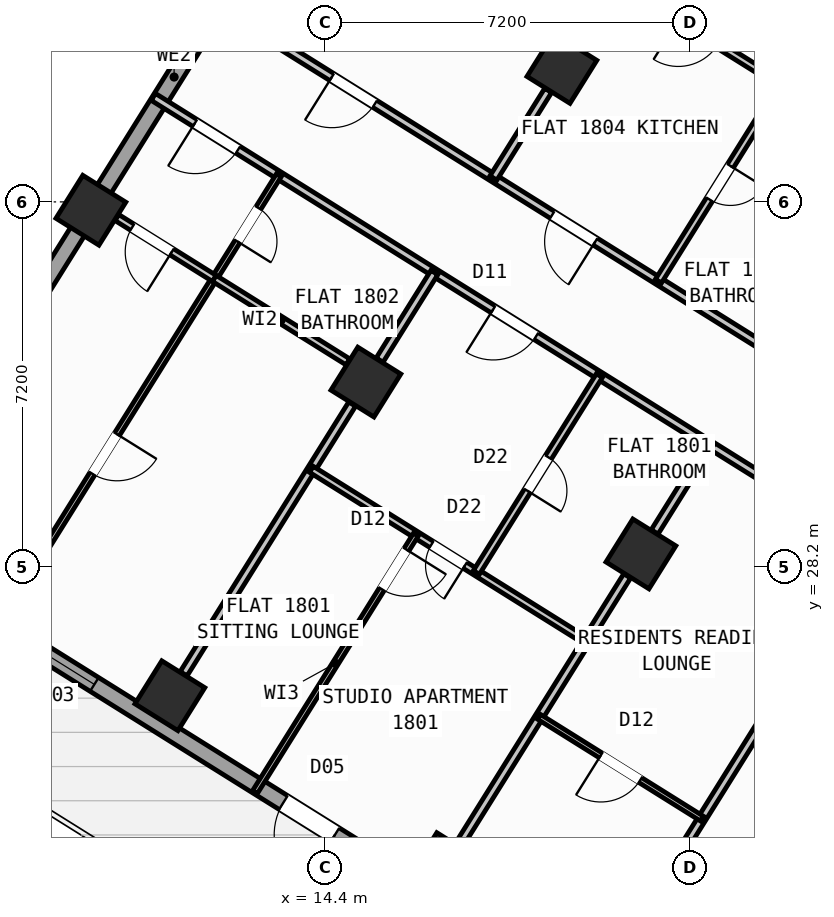
"""IFC4 building model, lengths in metres.
Left out: names, types, materials, properties, quantities, classifications, styles, units other than length and angle.
Written with IfcOpenShell. Run it as: python <this file> out.ifc"""

import sys

from ifc_helpers import new_model, si_unit, direction, frame, frame_2d, origin, origin_2d, place, context, subcontext, project, spatial, rectangle, hollow_rectangle, extrude, source, transform, mapped, element, fill, save


model = new_model("IFC4")
c1 = context("Model", 3, precision=1e-05, world=origin(), true_north=direction((0.0, 1.0)))
c2 = subcontext(c1, "Body", "Model", "MODEL_VIEW")
j1 = project(units=[si_unit("LENGTHUNIT", "METRE"), si_unit("PLANEANGLEUNIT", "RADIAN")], contexts=[c1])
p1 = place(None, origin())
s1 = spatial("IfcSite", under=j1, at=p1, CompositionType="ELEMENT")
p2 = place(p1, origin())
s2 = spatial("IfcBuilding", under=s1, at=p2, CompositionType="ELEMENT")
p3 = place(p2, frame((0.0, 0.0, 71.7)))
s3 = spatial("IfcBuildingStorey", under=s2, at=p3, CompositionType="ELEMENT", Elevation=71.7)
p4 = place(p3, frame((26.007, 24.976, 0.0), z_axis=(0.0, 0.0, 1.0), x_axis=(-0.529916319127, -0.848049936456, 0.0)))
e1 = element("IfcWall", 1, at=p4, inside=s3, PredefinedType="SHEAR", context=c2, shape_type="SweptSolid", body=[
    extrude(rectangle(XDim=6.375, YDim=0.65, at=frame_2d((3.188, 0.0))), origin(), (0.0, 0.0, 1.0), 4.52),
])
m1 = source(origin(), c2, "Body", "SweptSolid", [
    extrude(hollow_rectangle(XDim=1.0, YDim=1.0, WallThickness=0.04, at=origin_2d()), origin(), (0.0, 0.0, 1.0), 4.8),
])
for number, where, z_axis, x_axis in (
    (2, (20.632, 28.452, 0.0), (0.0, 0.0, 1.0), (-0.848, 0.53, 0.0)),
    (3, (16.764, 22.261, 0.0), (0.0, 0.0, 1.0), (-0.848, 0.53, 0.0)),
    (4, (19.073, 38.034, 0.0), (0.0, 0.0, 1.0), (-0.848, 0.53, 0.0)),
    (5, (15.205, 31.844, 0.0), (0.0, 0.0, 1.0), (-0.848, 0.53, 0.0)),
    (6, (11.336, 25.653, 0.0), (0.0, 0.0, 1.0), (-0.848, 0.53, 0.0)),
    (7, (9.777, 35.235, 0.0), (0.0, 0.0, 1.0), (-0.848, 0.53, 0.0)),
):
    element("IfcColumn", number, at=place(p3, frame(where, z_axis=z_axis, x_axis=x_axis)), inside=s3, PredefinedType="COLUMN", context=c2, shape_type="MappedRepresentation", body=[
        mapped(m1, transform((0.0, 0.0, 0.0), scale=1.0)),
    ])
p5 = place(p3, frame((31.76, 12.183, 0.0), z_axis=(0.0, 0.0, 1.0), x_axis=(-0.848047074256, 0.529920899612, 0.0)))
e8 = element("IfcWall", 8, at=p5, inside=s3, PredefinedType="STANDARD", context=c2, shape_type="SweptSolid", body=[
    extrude(rectangle(XDim=30.652, YDim=0.32, at=frame_2d((15.326, 0.0))), origin(), (0.0, 0.0, 1.0), 4.52),
])
p6 = place(p5, frame((20.241, 0.0, 0.0)))
e9 = element("IfcOpeningElement", 9, at=p6, cuts=e8, PredefinedType="OPENING", context=c2, shape_type="SweptSolid", body=[
    extrude(rectangle(XDim=1.2, YDim=2.15, at=frame_2d((0.6, 1.075))), frame((0.0, 0.17, 0.0), z_axis=(0.0, -1.0, 0.0), x_axis=(1.0, 0.0, 0.0)), (0.0, 0.0, 1.0), 0.34),
])
p7 = place(p5, frame((14.781, 0.0, 0.0)))
e10 = element("IfcOpeningElement", 10, at=p7, cuts=e8, PredefinedType="OPENING", context=c2, shape_type="SweptSolid", body=[
    extrude(rectangle(XDim=1.5, YDim=2.25, at=frame_2d((0.75, 1.125))), frame((0.0, 0.17, 0.0), z_axis=(0.0, -1.0, 0.0), x_axis=(1.0, 0.0, 0.0)), (0.0, 0.0, 1.0), 0.34),
])
p8 = place(p5, frame((1.84, 0.0, 0.75)))
e11 = element("IfcOpeningElement", 11, at=p8, cuts=e8, PredefinedType="OPENING", context=c2, shape_type="SweptSolid", body=[
    extrude(rectangle(XDim=2.4, YDim=1.6, at=frame_2d((1.2, 0.8))), frame((0.0, 0.17, 0.0), z_axis=(0.0, -1.0, 0.0), x_axis=(1.0, 0.0, 0.0)), (0.0, 0.0, 1.0), 0.34),
])
p9 = place(p5, frame((7.019, 0.0, 0.75)))
e12 = element("IfcOpeningElement", 12, at=p9, cuts=e8, PredefinedType="OPENING", context=c2, shape_type="SweptSolid", body=[
    extrude(rectangle(XDim=2.4, YDim=1.6, at=frame_2d((1.2, 0.8))), frame((0.0, 0.17, 0.0), z_axis=(0.0, -1.0, 0.0), x_axis=(1.0, 0.0, 0.0)), (0.0, 0.0, 1.0), 0.34),
])
p10 = place(p5, frame((25.841, 0.0, 0.95)))
e13 = element("IfcOpeningElement", 13, at=p10, cuts=e8, PredefinedType="OPENING", context=c2, shape_type="SweptSolid", body=[
    extrude(rectangle(XDim=1.2, YDim=1.4, at=frame_2d((0.6, 0.7))), frame((0.0, 0.17, 0.0), z_axis=(0.0, -1.0, 0.0), x_axis=(1.0, 0.0, 0.0)), (0.0, 0.0, 1.0), 0.34),
])
p11 = place(p3, frame((5.7, 28.71, 0.0), z_axis=(0.0, 0.0, 1.0), x_axis=(0.529923711467, 0.8480453172, 0.0)))
e14 = element("IfcWall", 14, at=p11, inside=s3, PredefinedType="STANDARD", context=c2, shape_type="SweptSolid", body=[
    extrude(rectangle(XDim=21.587, YDim=0.32, at=frame_2d((10.794, 0.0))), origin(), (0.0, 0.0, 1.0), 3.895),
])
p12 = place(p11, frame((2.844, 0.0, 0.75)))
e15 = element("IfcOpeningElement", 15, at=p12, cuts=e14, PredefinedType="OPENING", context=c2, shape_type="SweptSolid", body=[
    extrude(rectangle(XDim=2.4, YDim=1.6, at=frame_2d((1.2, 0.8))), frame((0.0, 0.17, 0.0), z_axis=(0.0, -1.0, 0.0), x_axis=(1.0, 0.0, 0.0)), (0.0, 0.0, 1.0), 0.34),
])
p13 = place(p3, frame((17.424, 47.083, 0.0), z_axis=(0.0, 0.0, 1.0), x_axis=(0.848049927979, -0.529916332693, 0.0)))
e16 = element("IfcWall", 16, at=p13, inside=s3, PredefinedType="STANDARD", context=c2, shape_type="SweptSolid", body=[
    extrude(rectangle(XDim=29.223, YDim=0.32, at=frame_2d((14.612, 0.0))), origin(), (0.0, 0.0, 1.0), 4.52),
])
p14 = place(p13, frame((3.339, 0.0, 0.0)))
e17 = element("IfcOpeningElement", 17, at=p14, cuts=e16, PredefinedType="OPENING", context=c2, shape_type="SweptSolid", body=[
    extrude(rectangle(XDim=1.05, YDim=2.15, at=frame_2d((0.525, 1.075))), frame((0.0, 0.17, 0.0), z_axis=(0.0, -1.0, 0.0), x_axis=(1.0, 0.0, 0.0)), (0.0, 0.0, 1.0), 0.34),
])
p15 = place(p13, frame((8.194, 0.0, 0.75)))
e18 = element("IfcOpeningElement", 18, at=p15, cuts=e16, PredefinedType="OPENING", context=c2, shape_type="SweptSolid", body=[
    extrude(rectangle(XDim=2.4, YDim=1.6, at=frame_2d((1.2, 0.8))), frame((0.0, 0.17, 0.0), z_axis=(0.0, -1.0, 0.0), x_axis=(1.0, 0.0, 0.0)), (0.0, 0.0, 1.0), 0.34),
])
p16 = place(p13, frame((22.226, 0.0, 0.85)))
e19 = element("IfcOpeningElement", 19, at=p16, cuts=e16, PredefinedType="OPENING", context=c2, shape_type="SweptSolid", body=[
    extrude(rectangle(XDim=1.8, YDim=1.5, at=frame_2d((0.9, 0.75))), frame((0.0, 0.17, 0.0), z_axis=(0.0, -1.0, 0.0), x_axis=(1.0, 0.0, 0.0)), (0.0, 0.0, 1.0), 0.34),
])
p17 = place(p13, frame((26.934, 0.0, 0.95)))
e20 = element("IfcOpeningElement", 20, at=p17, cuts=e16, PredefinedType="OPENING", context=c2, shape_type="SweptSolid", body=[
    extrude(rectangle(XDim=1.2, YDim=1.4, at=frame_2d((0.6, 0.7))), frame((0.0, 0.17, 0.0), z_axis=(0.0, -1.0, 0.0), x_axis=(1.0, 0.0, 0.0)), (0.0, 0.0, 1.0), 0.34),
])
p18 = place(p13, frame((14.636, 0.0, 1.0)))
e21 = element("IfcOpeningElement", 21, at=p18, cuts=e16, PredefinedType="OPENING", context=c2, shape_type="SweptSolid", body=[
    extrude(rectangle(XDim=0.9, YDim=1.25, at=frame_2d((0.45, 0.625))), frame((0.0, 0.17, 0.0), z_axis=(0.0, -1.0, 0.0), x_axis=(1.0, 0.0, 0.0)), (0.0, 0.0, 1.0), 0.34),
])
p19 = place(p3, frame((25.198, 28.606, 0.0), z_axis=(0.0, 0.0, 1.0), x_axis=(-0.529926497642, -0.848043576178, 0.0)))
e22 = element("IfcWall", 22, at=p19, inside=s3, PredefinedType="PARTITIONING", context=c2, shape_type="SweptSolid", body=[
    extrude(rectangle(XDim=10.3, YDim=0.16, at=frame_2d((5.15, 0.0))), origin(), (0.0, 0.0, 1.0), 4.51),
])
p20 = place(p3, frame((26.363, 30.472, 0.0), z_axis=(0.0, 0.0, 1.0), x_axis=(-0.848052408131, 0.529912363569, 0.0)))
e23 = element("IfcWall", 23, at=p20, inside=s3, PredefinedType="PARTITIONING", context=c2, shape_type="SweptSolid", body=[
    extrude(rectangle(XDim=16.73, YDim=0.16, at=frame_2d((8.365, 0.0))), origin(), (0.0, 0.0, 1.0), 4.51),
])
p21 = place(p20, frame((2.22, 0.0, 0.0)))
e24 = element("IfcOpeningElement", 24, at=p21, cuts=e23, PredefinedType="OPENING", context=c2, shape_type="SweptSolid", body=[
    extrude(rectangle(XDim=0.86, YDim=2.05, at=frame_2d((0.43, 1.025))), frame((0.0, 0.09, 0.0), z_axis=(0.0, -1.0, 0.0), x_axis=(1.0, 0.0, 0.0)), (0.0, 0.0, 1.0), 0.18),
])
p22 = place(p20, frame((7.82, 0.0, 0.0)))
e25 = element("IfcOpeningElement", 25, at=p22, cuts=e23, PredefinedType="OPENING", context=c2, shape_type="SweptSolid", body=[
    extrude(rectangle(XDim=1.0, YDim=2.1, at=frame_2d((0.5, 1.05))), frame((0.0, 0.09, 0.0), z_axis=(0.0, -1.0, 0.0), x_axis=(1.0, 0.0, 0.0)), (0.0, 0.0, 1.0), 0.18),
])
p23 = place(p20, frame((12.95, 0.0, 0.0)))
e26 = element("IfcOpeningElement", 26, at=p23, cuts=e23, PredefinedType="OPENING", context=c2, shape_type="SweptSolid", body=[
    extrude(rectangle(XDim=1.0, YDim=2.1, at=frame_2d((0.5, 1.05))), frame((0.0, 0.09, 0.0), z_axis=(0.0, -1.0, 0.0), x_axis=(1.0, 0.0, 0.0)), (0.0, 0.0, 1.0), 0.18),
])
p24 = place(p3, frame((25.198, 28.606, 0.0), z_axis=(0.0, 0.0, 1.0), x_axis=(-0.848052408131, 0.529912363569, 0.0)))
e27 = element("IfcWall", 27, at=p24, inside=s3, PredefinedType="PARTITIONING", context=c2, shape_type="SweptSolid", body=[
    extrude(rectangle(XDim=16.73, YDim=0.16, at=frame_2d((8.365, 0.0))), origin(), (0.0, 0.0, 1.0), 4.51),
])
p25 = place(p24, frame((1.395, 0.0, 0.0)))
e28 = element("IfcOpeningElement", 28, at=p25, cuts=e27, PredefinedType="OPENING", context=c2, shape_type="SweptSolid", body=[
    extrude(rectangle(XDim=1.0, YDim=2.1, at=frame_2d((0.5, 1.05))), frame((0.0, 0.09, 0.0), z_axis=(0.0, -1.0, 0.0), x_axis=(1.0, 0.0, 0.0)), (0.0, 0.0, 1.0), 0.18),
])
p26 = place(p24, frame((7.82, 0.0, 0.0)))
e29 = element("IfcOpeningElement", 29, at=p26, cuts=e27, PredefinedType="OPENING", context=c2, shape_type="SweptSolid", body=[
    extrude(rectangle(XDim=1.0, YDim=2.1, at=frame_2d((0.5, 1.05))), frame((0.0, 0.09, 0.0), z_axis=(0.0, -1.0, 0.0), x_axis=(1.0, 0.0, 0.0)), (0.0, 0.0, 1.0), 0.18),
])
p27 = place(p24, frame((14.76, 0.0, 0.0)))
e30 = element("IfcOpeningElement", 30, at=p27, cuts=e27, PredefinedType="OPENING", context=c2, shape_type="SweptSolid", body=[
    extrude(rectangle(XDim=1.0, YDim=2.1, at=frame_2d((0.5, 1.05))), frame((0.0, 0.09, 0.0), z_axis=(0.0, -1.0, 0.0), x_axis=(1.0, 0.0, 0.0)), (0.0, 0.0, 1.0), 0.18),
])
p28 = place(p3, frame((21.983, 30.615, 0.0), z_axis=(0.0, 0.0, 1.0), x_axis=(-0.529966635742, -0.848018493313, 0.0)))
e31 = element("IfcWall", 31, at=p28, inside=s3, PredefinedType="PARTITIONING", context=c2, shape_type="SweptSolid", body=[
    extrude(rectangle(XDim=2.038, YDim=0.16, at=frame_2d((1.019, 0.0))), origin(), (0.0, 0.0, 1.0), 3.895),
])
p29 = place(p3, frame((20.361, 28.018, 0.0), z_axis=(0.0, 0.0, 1.0), x_axis=(-0.529915015264, -0.848050751193, 0.0)))
e32 = element("IfcWall", 32, at=p29, inside=s3, PredefinedType="PARTITIONING", context=c2, shape_type="SweptSolid", body=[
    extrude(rectangle(XDim=6.276, YDim=0.16, at=frame_2d((3.138, 0.0))), origin(), (0.0, 0.0, 1.0), 3.895),
])
p30 = place(p3, frame((21.837, 23.228, 0.0), z_axis=(0.0, 0.0, 1.0), x_axis=(-0.84803087207, 0.529946827537, 0.0)))
e33 = element("IfcWall", 33, at=p30, inside=s3, PredefinedType="PARTITIONING", context=c2, shape_type="SweptSolid", body=[
    extrude(rectangle(XDim=3.79, YDim=0.11, at=frame_2d((1.895, 0.0))), origin(), (0.0, 0.0, 1.0), 4.51),
])
p31 = place(p30, frame((1.435, 0.0, 0.0)))
e34 = element("IfcOpeningElement", 34, at=p31, cuts=e33, PredefinedType="OPENING", context=c2, shape_type="SweptSolid", body=[
    extrude(rectangle(XDim=0.92, YDim=2.08, at=frame_2d((0.46, 1.04))), frame((0.0, 0.065, 0.0), z_axis=(0.0, -1.0, 0.0), x_axis=(1.0, 0.0, 0.0)), (0.0, 0.0, 1.0), 0.13),
])
p32 = place(p3, frame((16.556, 34.006, 0.0), z_axis=(0.0, 0.0, 1.0), x_axis=(-0.529966635742, -0.848018493313, 0.0)))
e35 = element("IfcWall", 35, at=p32, inside=s3, PredefinedType="PARTITIONING", context=c2, shape_type="SweptSolid", body=[
    extrude(rectangle(XDim=2.038, YDim=0.16, at=frame_2d((1.019, 0.0))), origin(), (0.0, 0.0, 1.0), 3.895),
])
p33 = place(p3, frame((14.933, 31.409, 0.0), z_axis=(0.0, 0.0, 1.0), x_axis=(-0.529897533635, -0.848061674554, 0.0)))
e36 = element("IfcWall", 36, at=p33, inside=s3, PredefinedType="PARTITIONING", context=c2, shape_type="SweptSolid", body=[
    extrude(rectangle(XDim=6.276, YDim=0.16, at=frame_2d((3.138, 0.0))), origin(), (0.0, 0.0, 1.0), 3.895),
])
p34 = place(p3, frame((19.556, 26.73, 0.0), z_axis=(0.0, 0.0, 1.0), x_axis=(-0.848049732085, 0.529916646191, 0.0)))
e37 = element("IfcWall", 37, at=p34, inside=s3, PredefinedType="PLUMBINGWALL", context=c2, shape_type="SweptSolid", body=[
    extrude(rectangle(XDim=6.4, YDim=0.14, at=frame_2d((3.2, 0.0))), origin(), (0.0, 0.0, 1.0), 4.51),
])
p35 = place(p34, frame((2.824, 0.0, 0.0)))
e38 = element("IfcOpeningElement", 38, at=p35, cuts=e37, PredefinedType="OPENING", context=c2, shape_type="SweptSolid", body=[
    extrude(rectangle(XDim=0.78, YDim=2.05, at=frame_2d((0.39, 1.025))), frame((0.0, 0.08, 0.0), z_axis=(0.0, -1.0, 0.0), x_axis=(1.0, 0.0, 0.0)), (0.0, 0.0, 1.0), 0.16),
])
p36 = place(p3, frame((19.812, 31.971, 0.0), z_axis=(0.0, 0.0, 1.0), x_axis=(-0.529917480809, -0.848049210561, 0.0)))
e39 = element("IfcWall", 39, at=p36, inside=s3, PredefinedType="PLUMBINGWALL", context=c2, shape_type="SweptSolid", body=[
    extrude(rectangle(XDim=4.58, YDim=0.14, at=frame_2d((2.29, 0.0))), origin(), (0.0, 0.0, 1.0), 4.51),
])
p37 = place(p36, frame((1.9, 0.0, 0.0)))
e40 = element("IfcOpeningElement", 40, at=p37, cuts=e39, PredefinedType="OPENING", context=c2, shape_type="SweptSolid", body=[
    extrude(rectangle(XDim=0.78, YDim=2.05, at=frame_2d((0.39, 1.025))), frame((0.0, 0.08, 0.0), z_axis=(0.0, -1.0, 0.0), x_axis=(1.0, 0.0, 0.0)), (0.0, 0.0, 1.0), 0.16),
])
p38 = place(p3, frame((16.191, 28.833, 0.0), z_axis=(0.0, 0.0, 1.0), x_axis=(-0.529900017123, -0.848060122782, 0.0)))
e41 = element("IfcWall", 41, at=p38, inside=s3, PredefinedType="PARTITIONING", context=c2, shape_type="SweptSolid", body=[
    extrude(rectangle(XDim=5.99, YDim=0.11, at=frame_2d((2.995, 0.0))), origin(), (0.0, 0.0, 1.0), 4.51),
])
p39 = place(p38, frame((0.35, 0.0, 0.0)))
e42 = element("IfcOpeningElement", 42, at=p39, cuts=e41, PredefinedType="OPENING", context=c2, shape_type="SweptSolid", body=[
    extrude(rectangle(XDim=0.92, YDim=2.08, at=frame_2d((0.46, 1.04))), frame((0.0, 0.065, 0.0), z_axis=(0.0, -1.0, 0.0), x_axis=(1.0, 0.0, 0.0)), (0.0, 0.0, 1.0), 0.13),
])
p40 = place(p3, frame((13.486, 35.924, 0.0), z_axis=(0.0, 0.0, 1.0), x_axis=(-0.529924195719, -0.848045014602, 0.0)))
e43 = element("IfcWall", 43, at=p40, inside=s3, PredefinedType="PARTITIONING", context=c2, shape_type="SweptSolid", body=[
    extrude(rectangle(XDim=10.57, YDim=0.11, at=frame_2d((5.285, 0.0))), origin(), (0.0, 0.0, 1.0), 4.51),
])
p41 = place(p40, frame((0.76, 0.0, 0.0)))
e44 = element("IfcOpeningElement", 44, at=p41, cuts=e43, PredefinedType="OPENING", context=c2, shape_type="SweptSolid", body=[
    extrude(rectangle(XDim=0.78, YDim=2.05, at=frame_2d((0.39, 1.025))), frame((0.0, 0.065, 0.0), z_axis=(0.0, -1.0, 0.0), x_axis=(1.0, 0.0, 0.0)), (0.0, 0.0, 1.0), 0.13),
])
p42 = place(p40, frame((6.025, 0.0, 0.0)))
e45 = element("IfcOpeningElement", 45, at=p42, cuts=e43, PredefinedType="OPENING", context=c2, shape_type="SweptSolid", body=[
    extrude(rectangle(XDim=0.92, YDim=2.08, at=frame_2d((0.46, 1.04))), frame((0.0, 0.065, 0.0), z_axis=(0.0, -1.0, 0.0), x_axis=(1.0, 0.0, 0.0)), (0.0, 0.0, 1.0), 0.13),
])
p43 = place(p3, frame((12.214, 33.889, 0.0), z_axis=(0.0, 0.0, 1.0), x_axis=(-0.848082963347, 0.529863460979, 0.0)))
e46 = element("IfcWall", 46, at=p43, inside=s3, PredefinedType="PLUMBINGWALL", context=c2, shape_type="SweptSolid", body=[
    extrude(rectangle(XDim=2.268, YDim=0.14, at=frame_2d((1.134, 0.0))), origin(), (0.0, 0.0, 1.0), 3.895),
])
p44 = place(p43, frame((0.99, 0.0, 0.0)))
e47 = element("IfcOpeningElement", 47, at=p44, cuts=e46, PredefinedType="OPENING", context=c2, shape_type="SweptSolid", body=[
    extrude(rectangle(XDim=0.92, YDim=2.08, at=frame_2d((0.46, 1.04))), frame((0.0, 0.08, 0.0), z_axis=(0.0, -1.0, 0.0), x_axis=(1.0, 0.0, 0.0)), (0.0, 0.0, 1.0), 0.16),
])
p45 = place(p3, frame((14.85, 32.242, 0.0), z_axis=(0.0, 0.0, 1.0), x_axis=(-0.848051256418, 0.529914206724, 0.0)))
e48 = element("IfcWall", 48, at=p45, inside=s3, PredefinedType="PLUMBINGWALL", context=c2, shape_type="SweptSolid", body=[
    extrude(rectangle(XDim=3.108, YDim=0.14, at=frame_2d((1.554, 0.0))), origin(), (0.0, 0.0, 1.0), 3.895),
])
p46 = place(p3, frame((18.802, 37.6, 0.0), z_axis=(0.0, 0.0, 1.0), x_axis=(-0.529880479764, -0.848072330149, 0.0)))
e49 = element("IfcWall", 49, at=p46, inside=s3, PredefinedType="PARTITIONING", context=c2, shape_type="SweptSolid", body=[
    extrude(rectangle(XDim=2.038, YDim=0.16, at=frame_2d((1.019, 0.0))), origin(), (0.0, 0.0, 1.0), 3.895),
])
p47 = place(p3, frame((25.576, 36.365, 0.0), z_axis=(0.0, 0.0, 1.0), x_axis=(-0.848056163074, 0.529906354247, 0.0)))
e50 = element("IfcWall", 50, at=p47, inside=s3, PredefinedType="PLUMBINGWALL", context=c2, shape_type="SweptSolid", body=[
    extrude(rectangle(XDim=6.4, YDim=0.14, at=frame_2d((3.2, 0.0))), origin(), (0.0, 0.0, 1.0), 4.51),
])
p48 = place(p47, frame((4.04, 0.0, 0.0)))
e51 = element("IfcOpeningElement", 51, at=p48, cuts=e50, PredefinedType="OPENING", context=c2, shape_type="SweptSolid", body=[
    extrude(rectangle(XDim=0.92, YDim=2.08, at=frame_2d((0.46, 1.04))), frame((0.0, 0.08, 0.0), z_axis=(0.0, -1.0, 0.0), x_axis=(1.0, 0.0, 0.0)), (0.0, 0.0, 1.0), 0.16),
])
p49 = place(p3, frame((23.405, 37.721, 0.0), z_axis=(0.0, 0.0, 1.0), x_axis=(-0.529955816375, -0.848025254748, 0.0)))
e52 = element("IfcWall", 52, at=p49, inside=s3, PredefinedType="PLUMBINGWALL", context=c2, shape_type="SweptSolid", body=[
    extrude(rectangle(XDim=4.58, YDim=0.14, at=frame_2d((2.29, 0.0))), origin(), (0.0, 0.0, 1.0), 4.51),
])
p50 = place(p49, frame((1.9, 0.0, 0.0)))
e53 = element("IfcOpeningElement", 53, at=p50, cuts=e52, PredefinedType="OPENING", context=c2, shape_type="SweptSolid", body=[
    extrude(rectangle(XDim=0.78, YDim=2.05, at=frame_2d((0.39, 1.025))), frame((0.0, 0.08, 0.0), z_axis=(0.0, -1.0, 0.0), x_axis=(1.0, 0.0, 0.0)), (0.0, 0.0, 1.0), 0.16),
])
m2 = source(origin(), c2, "Body", "SweptSolid", [
    extrude(rectangle(XDim=1.2, YDim=2.15, at=frame_2d((0.6, 1.075))), frame((0.0, 0.025, 0.0), z_axis=(0.0, -1.0, 0.0), x_axis=(1.0, 0.0, 0.0)), (0.0, 0.0, 1.0), 0.05),
])
p51 = place(p6, origin())
e54 = element("IfcDoor", 54, at=p51, inside=s3, OperationType="SINGLE_SWING_LEFT", PredefinedType="DOOR", context=c2, shape_type="MappedRepresentation", body=[
    mapped(m2, transform((0.0, 0.0, 0.0), scale=1.0)),
])
fill(e9, e54)
m3 = source(origin(), c2, "Body", "SweptSolid", [
    extrude(rectangle(XDim=1.2, YDim=1.4, at=frame_2d((0.6, 0.7))), frame((0.0, 0.03, 0.0), z_axis=(0.0, -1.0, 0.0), x_axis=(1.0, 0.0, 0.0)), (0.0, 0.0, 1.0), 0.06),
])
p52 = place(p10, origin())
e55 = element("IfcWindow", 55, at=p52, inside=s3, PartitioningType="SINGLE_PANEL", PredefinedType="WINDOW", context=c2, shape_type="MappedRepresentation", body=[
    mapped(m3, transform((0.0, 0.0, 0.0), scale=1.0)),
])
fill(e13, e55)
m4 = source(origin(), c2, "Body", "SweptSolid", [
    extrude(rectangle(XDim=0.92, YDim=2.08, at=frame_2d((0.46, 1.04))), frame((0.0, 0.025, 0.0), z_axis=(0.0, -1.0, 0.0), x_axis=(1.0, 0.0, 0.0)), (0.0, 0.0, 1.0), 0.05),
])
p53 = place(p31, origin())
e56 = element("IfcDoor", 56, at=p53, inside=s3, OperationType="SINGLE_SWING_RIGHT", PredefinedType="DOOR", context=c2, shape_type="MappedRepresentation", body=[
    mapped(m4, transform((0.0, 0.0, 0.0), scale=1.0)),
])
fill(e34, e56)
p54 = place(p39, origin())
e57 = element("IfcDoor", 57, at=p54, inside=s3, OperationType="SINGLE_SWING_LEFT", PredefinedType="DOOR", context=c2, shape_type="MappedRepresentation", body=[
    mapped(m4, transform((0.0, 0.0, 0.0), scale=1.0)),
])
fill(e42, e57)
m5 = source(origin(), c2, "Body", "SweptSolid", [
    extrude(rectangle(XDim=1.0, YDim=2.1, at=frame_2d((0.5, 1.05))), frame((0.0, 0.025, 0.0), z_axis=(0.0, -1.0, 0.0), x_axis=(1.0, 0.0, 0.0)), (0.0, 0.0, 1.0), 0.05),
])
p55 = place(p26, origin())
e58 = element("IfcDoor", 58, at=p55, inside=s3, OperationType="SINGLE_SWING_RIGHT", PredefinedType="DOOR", context=c2, shape_type="MappedRepresentation", body=[
    mapped(m5, transform((0.0, 0.0, 0.0), scale=1.0)),
])
fill(e29, e58)
m6 = source(origin(), c2, "Body", "SweptSolid", [
    extrude(rectangle(XDim=0.78, YDim=2.05, at=frame_2d((0.39, 1.025))), frame((0.0, 0.025, 0.0), z_axis=(0.0, -1.0, 0.0), x_axis=(1.0, 0.0, 0.0)), (0.0, 0.0, 1.0), 0.05),
])
p56 = place(p35, origin())
e59 = element("IfcDoor", 59, at=p56, inside=s3, OperationType="SINGLE_SWING_LEFT", PredefinedType="DOOR", context=c2, shape_type="MappedRepresentation", body=[
    mapped(m6, transform((0.0, 0.0, 0.0), scale=1.0)),
])
fill(e38, e59)
p57 = place(p37, origin())
e60 = element("IfcDoor", 60, at=p57, inside=s3, OperationType="SINGLE_SWING_RIGHT", PredefinedType="DOOR", context=c2, shape_type="MappedRepresentation", body=[
    mapped(m6, transform((0.0, 0.0, 0.0), scale=1.0)),
])
fill(e40, e60)
p58 = place(p27, origin())
e61 = element("IfcDoor", 61, at=p58, inside=s3, OperationType="SINGLE_SWING_RIGHT", PredefinedType="DOOR", context=c2, shape_type="MappedRepresentation", body=[
    mapped(m5, transform((0.0, 0.0, 0.0), scale=1.0)),
])
fill(e30, e61)
p59 = place(p44, origin())
e62 = element("IfcDoor", 62, at=p59, inside=s3, OperationType="SINGLE_SWING_LEFT", PredefinedType="DOOR", context=c2, shape_type="MappedRepresentation", body=[
    mapped(m4, transform((0.0, 0.0, 0.0), scale=1.0)),
])
fill(e47, e62)
p60 = place(p41, origin())
e63 = element("IfcDoor", 63, at=p60, inside=s3, OperationType="SINGLE_SWING_RIGHT", PredefinedType="DOOR", context=c2, shape_type="MappedRepresentation", body=[
    mapped(m6, transform((0.0, 0.0, 0.0), scale=1.0)),
])
fill(e44, e63)
p61 = place(p42, origin())
e64 = element("IfcDoor", 64, at=p61, inside=s3, OperationType="SINGLE_SWING_LEFT", PredefinedType="DOOR", context=c2, shape_type="MappedRepresentation", body=[
    mapped(m4, transform((0.0, 0.0, 0.0), scale=1.0)),
])
fill(e45, e64)
p62 = place(p22, origin())
e65 = element("IfcDoor", 65, at=p62, inside=s3, OperationType="SINGLE_SWING_LEFT", PredefinedType="DOOR", context=c2, shape_type="MappedRepresentation", body=[
    mapped(m5, transform((0.0, 0.0, 0.0), scale=1.0)),
])
fill(e25, e65)
p63 = place(p50, origin())
e66 = element("IfcDoor", 66, at=p63, inside=s3, OperationType="SINGLE_SWING_LEFT", PredefinedType="DOOR", context=c2, shape_type="MappedRepresentation", body=[
    mapped(m6, transform((0.0, 0.0, 0.0), scale=1.0)),
])
fill(e53, e66)
p64 = place(p23, origin())
e67 = element("IfcDoor", 67, at=p64, inside=s3, OperationType="SINGLE_SWING_RIGHT", PredefinedType="DOOR", context=c2, shape_type="MappedRepresentation", body=[
    mapped(m5, transform((0.0, 0.0, 0.0), scale=1.0)),
])
fill(e26, e67)
save(model, sys.argv[1])
